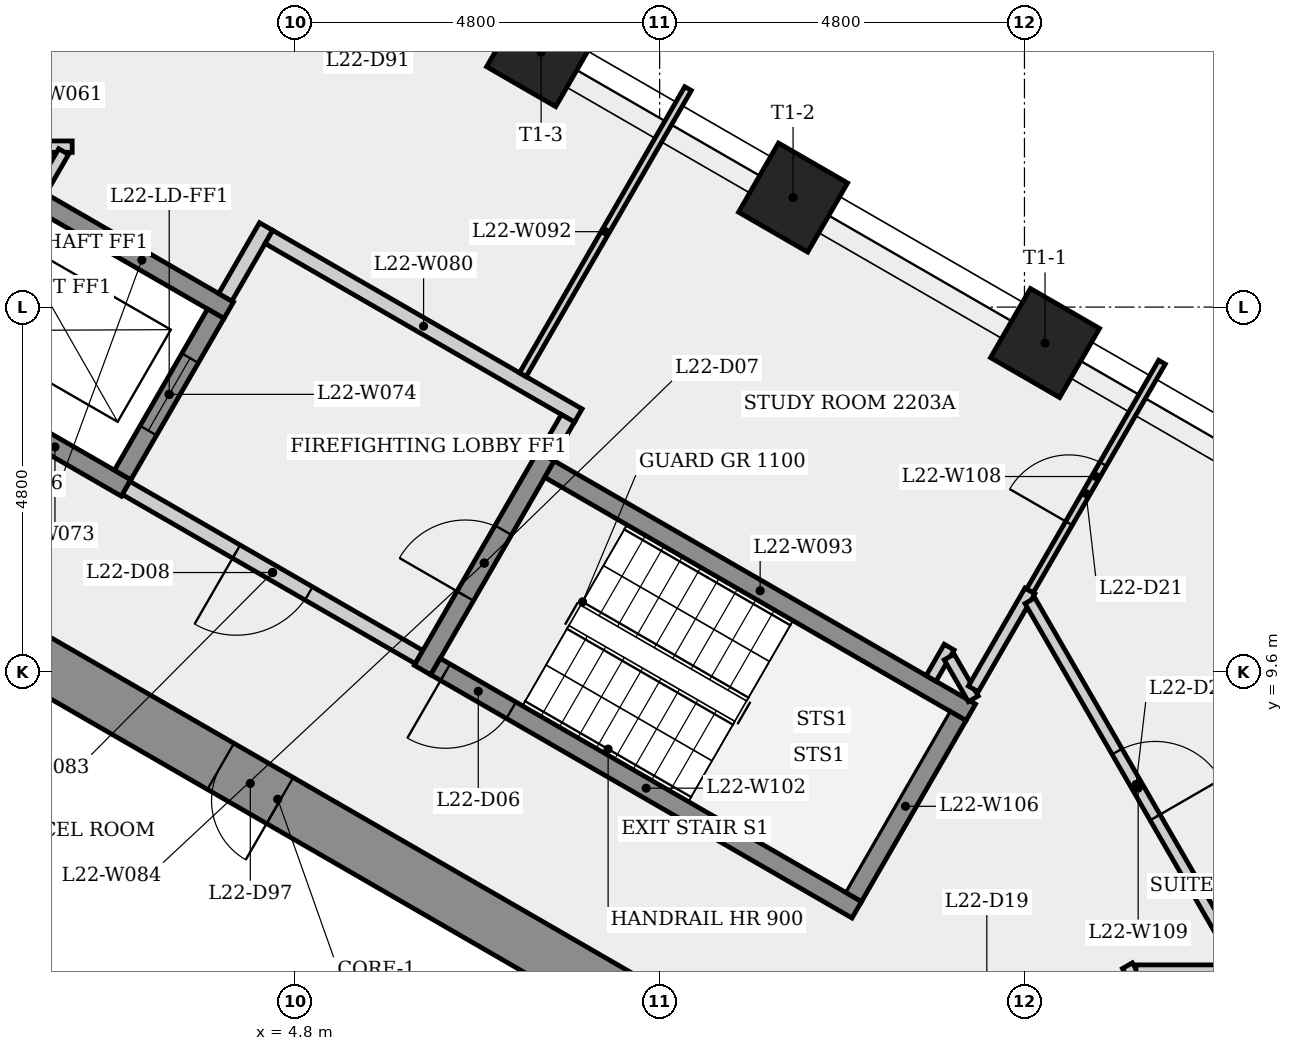
"""IFC4 building model, lengths in metres.
Left out: names, types, materials, properties, quantities, classifications, styles, units other than length and angle.
Written with IfcOpenShell. Run it as: python <this file> out.ifc"""

import sys

from ifc_helpers import new_model, si_unit, direction, frame, frame_2d, origin, origin_2d, place, context, subcontext, project, spatial, rectangle, extrude, element, fill, save


model = new_model("IFC4")
c1 = context("Model", 3, precision=1e-05, world=origin(), true_north=direction((0.0, 1.0)))
c2 = subcontext(c1, "Body", "Model", "MODEL_VIEW")
j1 = project(units=[si_unit("LENGTHUNIT", "METRE"), si_unit("PLANEANGLEUNIT", "RADIAN")], contexts=[c1])
p1 = place(None, origin())
s1 = spatial("IfcSite", under=j1, at=p1, CompositionType="ELEMENT")
p2 = place(p1, origin())
s2 = spatial("IfcBuilding", under=s1, at=p2, CompositionType="ELEMENT")
p3 = place(p2, frame((0.0, 0.0, 86.5)))
s3 = spatial("IfcBuildingStorey", under=s2, at=p3, CompositionType="ELEMENT", Elevation=86.5)
p4 = place(p3, frame((9.325, 5.182, 0.0), z_axis=(0.0, 0.0, 1.0), x_axis=(-0.866023993627, 0.500002442456, 0.0)))
e1 = element("IfcWall", 1, at=p4, inside=s3, PredefinedType="SHEAR", context=c2, shape_type="SweptSolid", body=[
    extrude(rectangle(XDim=10.97, YDim=0.7, at=frame_2d((5.485, 0.0))), origin(), (0.0, 0.0, 1.0), 3.4),
])
p5 = place(p4, frame((5.451, 0.0, 0.0)))
e2 = element("IfcOpeningElement", 2, at=p5, cuts=e1, PredefinedType="OPENING", context=c2, shape_type="SweptSolid", body=[
    extrude(rectangle(XDim=0.9, YDim=2.1, at=frame_2d((0.45, 1.05))), frame((0.0, 0.36, 0.0), z_axis=(0.0, -1.0, 0.0), x_axis=(1.0, 0.0, 0.0)), (0.0, 0.0, 1.0), 0.72),
])
for number, where, z_axis, x_axis in (
    (3, (14.671, 13.927, 0.0), (0.0, 0.0, 1.0), (0.5, 0.866, 0.0)),
    (4, (11.356, 15.841, 0.0), (0.0, 0.0, 1.0), (0.5, 0.866, 0.0)),
    (5, (8.041, 17.755, 0.0), (0.0, 0.0, 1.0), (0.5, 0.866, 0.0)),
):
    element("IfcColumn", number, at=place(p3, frame(where, z_axis=z_axis, x_axis=x_axis)), inside=s3, PredefinedType="COLUMN", context=c2, shape_type="SweptSolid", body=[
        extrude(rectangle(XDim=1.05, YDim=1.05, at=origin_2d()), origin(), (0.0, 0.0, 1.0), 3.4),
    ])
p6 = place(p3, frame((1.073, 16.008, 0.0), z_axis=(0.0, 0.0, 1.0), x_axis=(0.866040211805, -0.499974350878, 0.0)))
e6 = element("IfcWall", 6, at=p6, inside=s3, PredefinedType="SHEAR", context=c2, shape_type="SweptSolid", body=[
    extrude(rectangle(XDim=3.3, YDim=0.25, at=frame_2d((1.65, 0.0))), origin(), (0.0, 0.0, 1.0), 3.05),
])
p7 = place(p3, frame((1.144, 16.511, 0.0), z_axis=(0.0, 0.0, 1.0), x_axis=(1.0, 0.0, 0.0)))
e7 = element("IfcWall", 7, at=p7, inside=s3, PredefinedType="PARTITIONING", context=c2, shape_type="SweptSolid", body=[
    extrude(rectangle(XDim=0.727, YDim=0.15, at=frame_2d((0.364, 0.0))), origin(), (0.0, 0.0, 1.0), 3.05),
])
p8 = place(p3, frame((1.759, 16.446, 0.0), z_axis=(0.0, 0.0, 1.0), x_axis=(-0.499746055734, -0.86617196894, 0.0)))
e8 = element("IfcWall", 8, at=p8, inside=s3, PredefinedType="PARTITIONING", context=c2, shape_type="SweptSolid", body=[
    extrude(rectangle(XDim=0.597, YDim=0.15, at=frame_2d((0.298, 0.0))), origin(), (0.0, 0.0, 1.0), 3.05),
])
p9 = place(p3, frame((2.581, 12.02, 0.0), z_axis=(0.0, 0.0, 1.0), x_axis=(-0.86603892542, 0.499976579108, 0.0)))
e9 = element("IfcWall", 9, at=p9, inside=s3, PredefinedType="SHEAR", context=c2, shape_type="SweptSolid", body=[
    extrude(rectangle(XDim=2.162, YDim=0.25, at=frame_2d((1.081, 0.0))), origin(), (0.0, 0.0, 1.0), 3.05),
])
p10 = place(p3, frame((2.535, 12.191, 0.0), z_axis=(0.0, 0.0, 1.0), x_axis=(0.500061746146, 0.865989751695, 0.0)))
e10 = element("IfcWall", 10, at=p10, inside=s3, PredefinedType="SHEAR", context=c2, shape_type="SweptSolid", body=[
    extrude(rectangle(XDim=2.45, YDim=0.25, at=frame_2d((1.225, 0.0))), origin(), (0.0, 0.0, 1.0), 3.4),
])
p11 = place(p10, frame((0.675, 0.0, 0.0)))
e11 = element("IfcOpeningElement", 11, at=p11, cuts=e10, PredefinedType="OPENING", context=c2, shape_type="SweptSolid", body=[
    extrude(rectangle(XDim=1.1, YDim=2.1, at=frame_2d((0.55, 1.05))), frame((0.0, 0.135, 0.0), z_axis=(0.0, -1.0, 0.0), x_axis=(1.0, 0.0, 0.0)), (0.0, 0.0, 1.0), 0.27),
])
p12 = place(p3, frame((3.885, 14.529, 0.0), z_axis=(0.0, 0.0, 1.0), x_axis=(0.499997628298, 0.866026773083, 0.0)))
e12 = element("IfcWall", 12, at=p12, inside=s3, PredefinedType="PARTITIONING", context=c2, shape_type="SweptSolid", body=[
    extrude(rectangle(XDim=1.075, YDim=0.2, at=frame_2d((0.538, 0.0))), origin(), (0.0, 0.0, 1.0), 3.05),
])
p13 = place(p3, frame((4.459, 15.323, 0.0), z_axis=(0.0, 0.0, 1.0), x_axis=(0.866016039709, -0.500016218704, 0.0)))
e13 = element("IfcWall", 13, at=p13, inside=s3, PredefinedType="PARTITIONING", context=c2, shape_type="SweptSolid", body=[
    extrude(rectangle(XDim=4.7, YDim=0.2, at=frame_2d((2.35, 0.0))), origin(), (0.0, 0.0, 1.0), 3.05),
])
p14 = place(p3, frame((6.435, 9.795, 0.0), z_axis=(0.0, 0.0, 1.0), x_axis=(-0.866012907634, 0.500021643343, 0.0)))
e14 = element("IfcWall", 14, at=p14, inside=s3, PredefinedType="PARTITIONING", context=c2, shape_type="SweptSolid", body=[
    extrude(rectangle(XDim=4.45, YDim=0.2, at=frame_2d((2.225, 0.0))), origin(), (0.0, 0.0, 1.0), 3.05),
])
p15 = place(p14, frame((1.675, 0.0, 0.0)))
e15 = element("IfcOpeningElement", 15, at=p15, cuts=e14, PredefinedType="OPENING", context=c2, shape_type="SweptSolid", body=[
    extrude(rectangle(XDim=1.1, YDim=2.1, at=frame_2d((0.55, 1.05))), frame((0.0, 0.11, 0.0), z_axis=(0.0, -1.0, 0.0), x_axis=(1.0, 0.0, 0.0)), (0.0, 0.0, 1.0), 0.22),
])
p16 = place(p3, frame((6.48, 9.624, 0.0), z_axis=(0.0, 0.0, 1.0), x_axis=(0.500017246033, 0.866015446554, 0.0)))
e16 = element("IfcWall", 16, at=p16, inside=s3, PredefinedType="SHEAR", context=c2, shape_type="SweptSolid", body=[
    extrude(rectangle(XDim=3.25, YDim=0.25, at=frame_2d((1.625, 0.0))), origin(), (0.0, 0.0, 1.0), 3.05),
])
p17 = place(p16, frame((1.125, 0.0, 0.0)))
e17 = element("IfcOpeningElement", 17, at=p17, cuts=e16, PredefinedType="OPENING", context=c2, shape_type="SweptSolid", body=[
    extrude(rectangle(XDim=1.0, YDim=2.1, at=frame_2d((0.5, 1.05))), frame((0.0, 0.135, 0.0), z_axis=(0.0, -1.0, 0.0), x_axis=(1.0, 0.0, 0.0)), (0.0, 0.0, 1.0), 0.27),
])
p18 = place(p3, frame((7.8, 13.51, 0.0), z_axis=(0.0, 0.0, 1.0), x_axis=(0.499986584829, 0.866033148899, 0.0)))
e18 = element("IfcWall", 18, at=p18, inside=s3, PredefinedType="PARTITIONING", context=c2, shape_type="SweptSolid", body=[
    extrude(rectangle(XDim=4.347, YDim=0.1, at=frame_2d((2.174, 0.0))), origin(), (0.0, 0.0, 1.0), 3.05),
])
p19 = place(p3, frame((8.151, 12.268, 0.0), z_axis=(0.0, 0.0, 1.0), x_axis=(0.866025499775, -0.499999833739, 0.0)))
e19 = element("IfcWall", 19, at=p19, inside=s3, PredefinedType="SHEAR", context=c2, shape_type="SweptSolid", body=[
    extrude(rectangle(XDim=6.4, YDim=0.25, at=frame_2d((3.2, 0.0))), origin(), (0.0, 0.0, 1.0), 3.05),
])
p20 = place(p3, frame((8.393, 12.937, 0.0), z_axis=(0.0, 0.0, 1.0), x_axis=(-0.500065409566, -0.86598763626, 0.0)))
e20 = element("IfcWall", 20, at=p20, inside=s3, PredefinedType="PARTITIONING", context=c2, shape_type="SweptSolid", body=[
    extrude(rectangle(XDim=0.575, YDim=0.2, at=frame_2d((0.288, 0.0))), origin(), (0.0, 0.0, 1.0), 3.05),
])
p21 = place(p3, frame((12.194, 6.47, 0.0), z_axis=(0.0, 0.0, 1.0), x_axis=(-0.866025499775, 0.499999833739, 0.0)))
e21 = element("IfcWall", 21, at=p21, inside=s3, PredefinedType="SHEAR", context=c2, shape_type="SweptSolid", body=[
    extrude(rectangle(XDim=6.4, YDim=0.25, at=frame_2d((3.2, 0.0))), origin(), (0.0, 0.0, 1.0), 3.05),
])
p22 = place(p21, frame((5.25, 0.0, 0.0)))
e22 = element("IfcOpeningElement", 22, at=p22, cuts=e21, PredefinedType="OPENING", context=c2, shape_type="SweptSolid", body=[
    extrude(rectangle(XDim=1.0, YDim=2.1, at=frame_2d((0.5, 1.05))), frame((0.0, 0.135, 0.0), z_axis=(0.0, -1.0, 0.0), x_axis=(1.0, 0.0, 0.0)), (0.0, 0.0, 1.0), 0.27),
])
p23 = place(p3, frame((13.172, 9.514, 0.0), z_axis=(0.0, 0.0, 1.0), x_axis=(0.500003887042, 0.866023159588, 0.0)))
e23 = element("IfcWall", 23, at=p23, inside=s3, PredefinedType="PARTITIONING", context=c2, shape_type="SweptSolid", body=[
    extrude(rectangle(XDim=0.476, YDim=0.15, at=frame_2d((0.238, 0.0))), origin(), (0.0, 0.0, 1.0), 3.05),
])
p24 = place(p3, frame((13.409, 9.796, 0.0), z_axis=(0.0, 0.0, 1.0), x_axis=(0.500232755635, -0.865890980545, 0.0)))
e24 = element("IfcWall", 24, at=p24, inside=s3, PredefinedType="PARTITIONING", context=c2, shape_type="SweptSolid", body=[
    extrude(rectangle(XDim=0.635, YDim=0.15, at=frame_2d((0.317, 0.0))), origin(), (0.0, 0.0, 1.0), 3.05),
])
p25 = place(p3, frame((13.523, 9.022, 0.0), z_axis=(0.0, 0.0, 1.0), x_axis=(-0.500034990121, -0.866005201286, 0.0)))
e25 = element("IfcWall", 25, at=p25, inside=s3, PredefinedType="SHEAR", context=c2, shape_type="SweptSolid", body=[
    extrude(rectangle(XDim=2.75, YDim=0.25, at=frame_2d((1.375, 0.0))), origin(), (0.0, 0.0, 1.0), 3.05),
])
p26 = place(p3, frame((13.727, 9.376, 0.0), z_axis=(0.0, 0.0, 1.0), x_axis=(0.500015540671, 0.866016431188, 0.0)))
e26 = element("IfcWall", 26, at=p26, inside=s3, PredefinedType="PARTITIONING", context=c2, shape_type="SweptSolid", body=[
    extrude(rectangle(XDim=1.49, YDim=0.15, at=frame_2d((0.745, 0.0))), origin(), (0.0, 0.0, 1.0), 3.05),
])
p27 = place(p3, frame((14.472, 10.667, 0.0), z_axis=(0.0, 0.0, 1.0), x_axis=(0.499994200737, 0.866028751965, 0.0)))
e27 = element("IfcWall", 27, at=p27, inside=s3, PredefinedType="PARTITIONING", context=c2, shape_type="SweptSolid", body=[
    extrude(rectangle(XDim=3.474, YDim=0.1, at=frame_2d((1.737, 0.0))), origin(), (0.0, 0.0, 1.0), 3.05),
])
p28 = place(p27, frame((1.026, 0.0, 0.0)))
e28 = element("IfcOpeningElement", 28, at=p28, cuts=e27, PredefinedType="OPENING", context=c2, shape_type="SweptSolid", body=[
    extrude(rectangle(XDim=0.9, YDim=2.1, at=frame_2d((0.45, 1.05))), frame((0.0, 0.06, 0.0), z_axis=(0.0, -1.0, 0.0), x_axis=(1.0, 0.0, 0.0)), (0.0, 0.0, 1.0), 0.12),
])
p29 = place(p3, frame((14.472, 10.537, 0.0), z_axis=(0.0, 0.0, 1.0), x_axis=(0.499998302717, -0.866026383709, 0.0)))
e29 = element("IfcWall", 29, at=p29, inside=s3, PredefinedType="PARTITIONING", context=c2, shape_type="SweptSolid", body=[
    extrude(rectangle(XDim=5.695, YDim=0.15, at=frame_2d((2.847, 0.0))), origin(), (0.0, 0.0, 1.0), 3.05),
])
p30 = place(p29, frame((2.293, 0.0, 0.0)))
e30 = element("IfcOpeningElement", 30, at=p30, cuts=e29, PredefinedType="OPENING", context=c2, shape_type="SweptSolid", body=[
    extrude(rectangle(XDim=1.0, YDim=2.1, at=frame_2d((0.5, 1.05))), frame((0.0, 0.085, 0.0), z_axis=(0.0, -1.0, 0.0), x_axis=(1.0, 0.0, 0.0)), (0.0, 0.0, 1.0), 0.17),
])
p31 = place(p3, frame((15.754, 5.735, 0.0), z_axis=(0.0, 0.0, 1.0), x_axis=(0.500018540756, -0.866014699009, 0.0)))
e31 = element("IfcWall", 31, at=p31, inside=s3, PredefinedType="PARTITIONING", context=c2, shape_type="SweptSolid", body=[
    extrude(rectangle(XDim=0.785, YDim=0.15, at=frame_2d((0.393, 0.0))), origin(), (0.0, 0.0, 1.0), 3.05),
])
p32 = place(p3, frame((17.207, 5.67, 0.0), z_axis=(0.0, 0.0, 1.0), x_axis=(-1.0, 0.0, 0.0)))
e32 = element("IfcWall", 32, at=p32, inside=s3, PredefinedType="PARTITIONING", context=c2, shape_type="SweptSolid", body=[
    extrude(rectangle(XDim=1.34, YDim=0.15, at=frame_2d((0.67, 0.0))), origin(), (0.0, 0.0, 1.0), 3.05),
])
p33 = place(p22, origin())
e33 = element("IfcDoor", 33, at=p33, inside=s3, OperationType="SINGLE_SWING_RIGHT", PredefinedType="DOOR", context=c2, shape_type="SweptSolid", body=[
    extrude(rectangle(XDim=1.0, YDim=2.1, at=frame_2d((0.5, 1.05))), frame((0.0, 0.025, 0.0), z_axis=(0.0, -1.0, 0.0), x_axis=(1.0, 0.0, 0.0)), (0.0, 0.0, 1.0), 0.05),
])
fill(e22, e33)
p34 = place(p17, origin())
e34 = element("IfcDoor", 34, at=p34, inside=s3, OperationType="SINGLE_SWING_LEFT", PredefinedType="DOOR", context=c2, shape_type="SweptSolid", body=[
    extrude(rectangle(XDim=1.0, YDim=2.1, at=frame_2d((0.5, 1.05))), frame((0.0, 0.025, 0.0), z_axis=(0.0, -1.0, 0.0), x_axis=(1.0, 0.0, 0.0)), (0.0, 0.0, 1.0), 0.05),
])
fill(e17, e34)
p35 = place(p15, origin())
e35 = element("IfcDoor", 35, at=p35, inside=s3, OperationType="SINGLE_SWING_RIGHT", PredefinedType="DOOR", context=c2, shape_type="SweptSolid", body=[
    extrude(rectangle(XDim=1.1, YDim=2.1, at=frame_2d((0.55, 1.05))), frame((0.0, 0.025, 0.0), z_axis=(0.0, -1.0, 0.0), x_axis=(1.0, 0.0, 0.0)), (0.0, 0.0, 1.0), 0.05),
])
fill(e15, e35)
p36 = place(p11, origin())
e36 = element("IfcDoor", 36, at=p36, inside=s3, OperationType="SLIDING_TO_LEFT", PredefinedType="DOOR", context=c2, shape_type="SweptSolid", body=[
    extrude(rectangle(XDim=1.1, YDim=2.1, at=frame_2d((0.55, 1.05))), frame((0.0, 0.025, 0.0), z_axis=(0.0, -1.0, 0.0), x_axis=(1.0, 0.0, 0.0)), (0.0, 0.0, 1.0), 0.05),
])
fill(e11, e36)
p37 = place(p30, origin())
e37 = element("IfcDoor", 37, at=p37, inside=s3, OperationType="SINGLE_SWING_RIGHT", PredefinedType="DOOR", context=c2, shape_type="SweptSolid", body=[
    extrude(rectangle(XDim=1.0, YDim=2.1, at=frame_2d((0.5, 1.05))), frame((0.0, 0.025, 0.0), z_axis=(0.0, -1.0, 0.0), x_axis=(1.0, 0.0, 0.0)), (0.0, 0.0, 1.0), 0.05),
])
fill(e30, e37)
p38 = place(p28, origin())
e38 = element("IfcDoor", 38, at=p38, inside=s3, OperationType="SINGLE_SWING_LEFT", PredefinedType="DOOR", context=c2, shape_type="SweptSolid", body=[
    extrude(rectangle(XDim=0.9, YDim=2.1, at=frame_2d((0.45, 1.05))), frame((0.0, 0.025, 0.0), z_axis=(0.0, -1.0, 0.0), x_axis=(1.0, 0.0, 0.0)), (0.0, 0.0, 1.0), 0.05),
])
fill(e28, e38)
p39 = place(p5, origin())
e39 = element("IfcDoor", 39, at=p39, inside=s3, OperationType="SINGLE_SWING_LEFT", PredefinedType="DOOR", context=c2, shape_type="SweptSolid", body=[
    extrude(rectangle(XDim=0.9, YDim=2.1, at=frame_2d((0.45, 1.05))), frame((0.0, 0.025, 0.0), z_axis=(0.0, -1.0, 0.0), x_axis=(1.0, 0.0, 0.0)), (0.0, 0.0, 1.0), 0.05),
])
fill(e2, e39)
save(model, sys.argv[1])
